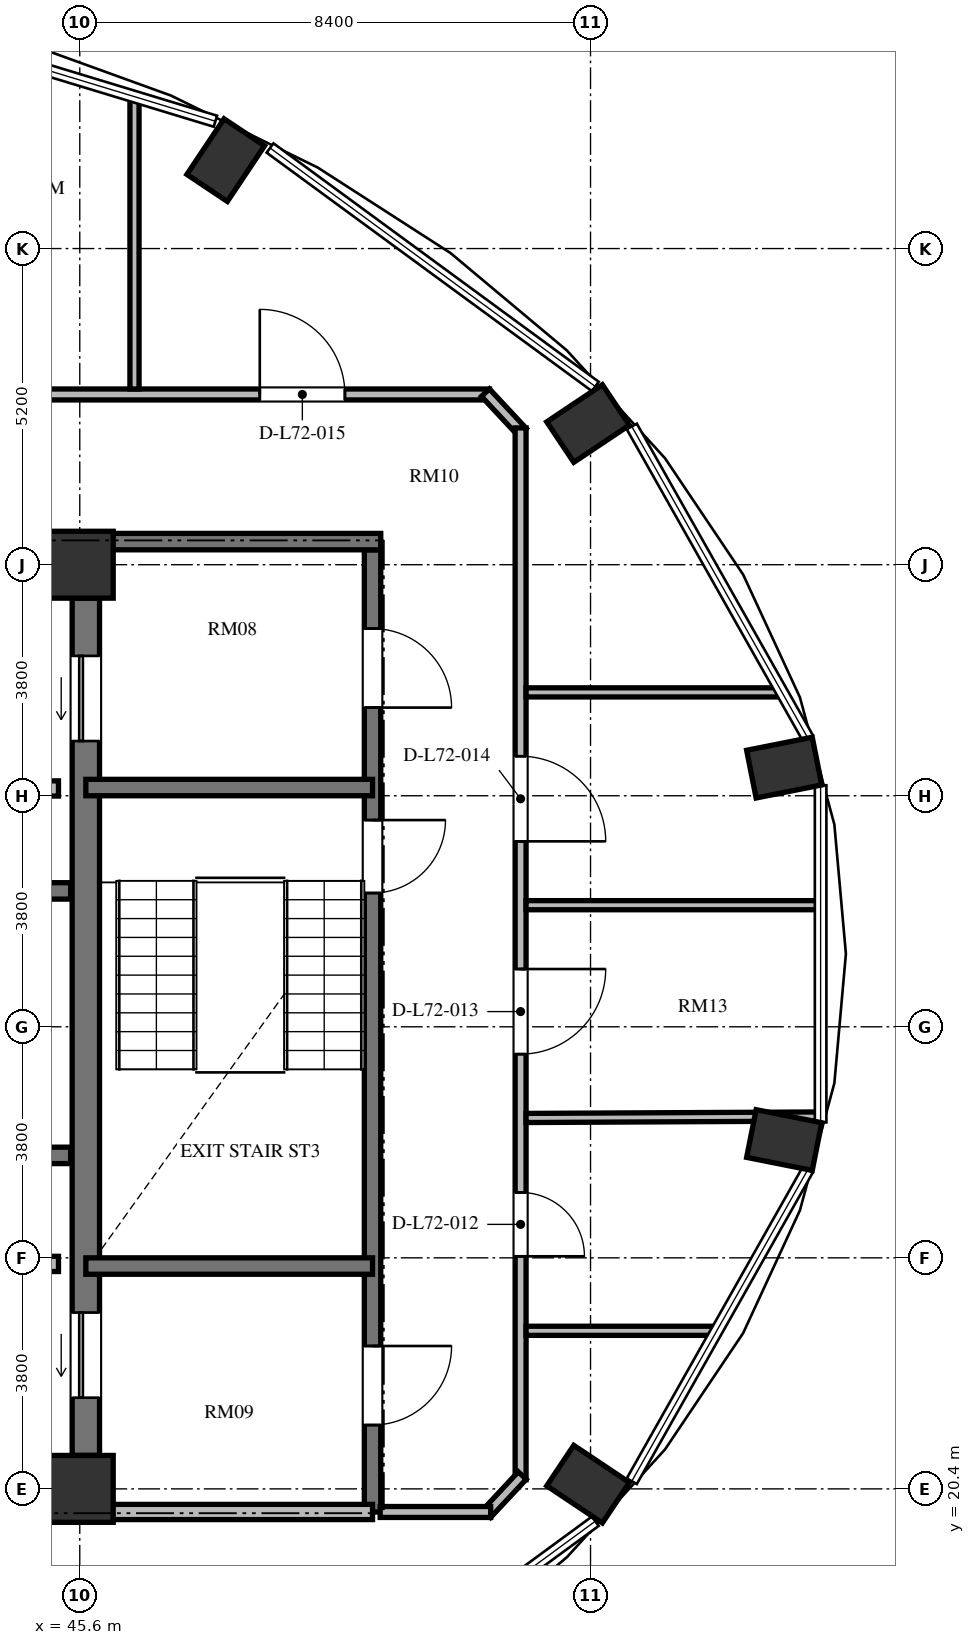
"""IFC4 building model, lengths in metres.
Left out: names, types, materials, properties, quantities, classifications, styles, units other than length and angle.
Written with IfcOpenShell. Run it as: python <this file> out.ifc"""

import sys

from ifc_helpers import new_model, si_unit, direction, frame, frame_2d, origin, origin_2d, place, context, subcontext, project, spatial, rectangle, extrude, element, fill, save


model = new_model("IFC4")
c1 = context("Model", 3, precision=1e-05, world=origin(), true_north=direction((0.0, 1.0)))
c2 = subcontext(c1, "Body", "Model", "MODEL_VIEW")
j1 = project(units=[si_unit("LENGTHUNIT", "METRE"), si_unit("PLANEANGLEUNIT", "RADIAN")], contexts=[c1])
p1 = place(None, origin())
s1 = spatial("IfcSite", under=j1, at=p1, CompositionType="ELEMENT")
p2 = place(p1, origin())
s2 = spatial("IfcBuilding", under=s1, at=p2, CompositionType="ELEMENT")
p3 = place(p2, frame((0.0, 0.0, 276.912)))
s3 = spatial("IfcBuildingStorey", under=s2, at=p3, CompositionType="ELEMENT", Elevation=276.912)
for number, where, z_axis, x_axis in (
    (1, (53.96, 20.478, 0.0), (0.0, 0.0, 1.0), (0.831, -0.556, 0.0)),
    (2, (57.185, 26.137, 0.0), (0.0, 0.0, 1.0), (0.981, -0.195, 0.0)),
    (3, (57.185, 32.263, 0.0), (0.0, 0.0, 1.0), (0.981, 0.195, 0.0)),
    (4, (53.96, 37.923, 0.0), (0.0, 0.0, 1.0), (0.831, 0.556, 0.0)),
    (5, (48.0, 42.254, 0.0), (0.0, 0.0, 1.0), (0.556, 0.831, 0.0)),
):
    element("IfcColumn", number, at=place(p3, frame(where, z_axis=z_axis, x_axis=x_axis)), inside=s3, PredefinedType="COLUMN", context=c2, shape_type="SweptSolid", body=[
        extrude(rectangle(XDim=1.1, YDim=0.8, at=origin_2d()), origin(), (0.0, 0.0, 1.0), 3.648),
    ])
for number, where, z_axis, x_axis in (
    (6, (45.6, 20.4, 0.0), (0.0, 0.0, 1.0), (1.0, 0.0, 0.0)),
    (7, (45.6, 35.6, 0.0), (0.0, 0.0, 1.0), (1.0, 0.0, 0.0)),
):
    element("IfcColumn", number, at=place(p3, frame(where, z_axis=z_axis, x_axis=x_axis)), inside=s3, PredefinedType="COLUMN", context=c2, shape_type="SweptSolid", body=[
        extrude(rectangle(XDim=1.1, YDim=1.1, at=origin_2d()), origin(), (0.0, 0.0, 1.0), 3.648),
    ])
p4 = place(p3, frame((45.7, 20.95, 0.0), z_axis=(0.0, 0.0, 1.0), x_axis=(0.0, 1.0, 0.0)))
e8 = element("IfcWall", 8, at=p4, inside=s3, PredefinedType="SHEAR", context=c2, shape_type="SweptSolid", body=[
    extrude(rectangle(XDim=14.1, YDim=0.45, at=frame_2d((7.05, 0.0))), origin(), (0.0, 0.0, 1.0), 3.648),
])
p5 = place(p4, frame((11.75, 0.0, 0.0)))
e9 = element("IfcOpeningElement", 9, at=p5, cuts=e8, PredefinedType="OPENING", context=c2, shape_type="SweptSolid", body=[
    extrude(rectangle(XDim=1.4, YDim=2.3, at=frame_2d((0.7, 1.15))), frame((0.0, 0.235, 0.0), z_axis=(0.0, -1.0, 0.0), x_axis=(1.0, 0.0, 0.0)), (0.0, 0.0, 1.0), 0.47),
])
p6 = place(p4, frame((0.95, 0.0, 0.0)))
e10 = element("IfcOpeningElement", 10, at=p6, cuts=e8, PredefinedType="OPENING", context=c2, shape_type="SweptSolid", body=[
    extrude(rectangle(XDim=1.4, YDim=2.3, at=frame_2d((0.7, 1.15))), frame((0.0, 0.235, 0.0), z_axis=(0.0, -1.0, 0.0), x_axis=(1.0, 0.0, 0.0)), (0.0, 0.0, 1.0), 0.47),
])
p7 = place(p3, frame((37.465, 30.235, 0.0), z_axis=(0.0, 0.0, 1.0), x_axis=(1.0, 0.0, 0.0)))
e11 = element("IfcWall", 11, at=p7, inside=s3, PredefinedType="SHEAR", context=c2, shape_type="SweptSolid", body=[
    extrude(rectangle(XDim=7.985, YDim=0.27, at=frame_2d((3.992, 0.0))), origin(), (0.0, 0.0, 1.0), 3.648),
])
p8 = place(p7, frame((6.455, 0.0, 0.0)))
e12 = element("IfcOpeningElement", 12, at=p8, cuts=e11, PredefinedType="OPENING", context=c2, shape_type="SweptSolid", body=[
    extrude(rectangle(XDim=1.2, YDim=2.15, at=frame_2d((0.6, 1.075))), frame((0.0, 0.145, 0.0), z_axis=(0.0, -1.0, 0.0), x_axis=(1.0, 0.0, 0.0)), (0.0, 0.0, 1.0), 0.29),
])
p9 = place(p3, frame((37.465, 25.885, 0.0), z_axis=(0.0, 0.0, 1.0), x_axis=(1.0, 0.0, 0.0)))
e13 = element("IfcWall", 13, at=p9, inside=s3, PredefinedType="SHEAR", context=c2, shape_type="SweptSolid", body=[
    extrude(rectangle(XDim=7.985, YDim=0.27, at=frame_2d((3.992, 0.0))), origin(), (0.0, 0.0, 1.0), 3.648),
])
for number, where, z_axis, x_axis in (
    (14, (42.95, 31.92, 0.0), (0.0, 0.0, 1.0), (1.0, 0.0, 0.0)),
    (15, (42.95, 24.1, 0.0), (0.0, 0.0, 1.0), (1.0, 0.0, 0.0)),
):
    element("IfcWall", number, at=place(p3, frame(where, z_axis=z_axis, x_axis=x_axis)), inside=s3, PredefinedType="SOLIDWALL", context=c2, shape_type="SweptSolid", body=[
        extrude(rectangle(XDim=2.3, YDim=0.25, at=frame_2d((1.15, 0.0))), origin(), (0.0, 0.0, 1.0), 3.448),
    ])
p10 = place(p3, frame((50.415, 35.845, 0.0), z_axis=(0.0, 0.0, 1.0), x_axis=(0.0, -1.0, 0.0)))
e16 = element("IfcWall", 16, at=p10, inside=s3, PredefinedType="SHEAR", context=c2, shape_type="SweptSolid", body=[
    extrude(rectangle(XDim=15.825, YDim=0.27, at=frame_2d((7.913, 0.0))), origin(), (0.0, 0.0, 1.0), 3.648),
])
p11 = place(p10, frame((4.445, 0.0, 0.0)))
e17 = element("IfcOpeningElement", 17, at=p11, cuts=e16, PredefinedType="OPENING", context=c2, shape_type="SweptSolid", body=[
    extrude(rectangle(XDim=1.2, YDim=2.15, at=frame_2d((0.6, 1.075))), frame((0.0, 0.145, 0.0), z_axis=(0.0, -1.0, 0.0), x_axis=(1.0, 0.0, 0.0)), (0.0, 0.0, 1.0), 0.29),
])
p12 = place(p10, frame((1.295, 0.0, 0.0)))
e18 = element("IfcOpeningElement", 18, at=p12, cuts=e16, PredefinedType="OPENING", context=c2, shape_type="SweptSolid", body=[
    extrude(rectangle(XDim=1.3, YDim=2.2, at=frame_2d((0.65, 1.1))), frame((0.0, 0.145, 0.0), z_axis=(0.0, -1.0, 0.0), x_axis=(1.0, 0.0, 0.0)), (0.0, 0.0, 1.0), 0.29),
])
p13 = place(p10, frame((13.095, 0.0, 0.0)))
e19 = element("IfcOpeningElement", 19, at=p13, cuts=e16, PredefinedType="OPENING", context=c2, shape_type="SweptSolid", body=[
    extrude(rectangle(XDim=1.3, YDim=2.2, at=frame_2d((0.65, 1.1))), frame((0.0, 0.145, 0.0), z_axis=(0.0, -1.0, 0.0), x_axis=(1.0, 0.0, 0.0)), (0.0, 0.0, 1.0), 0.29),
])
p14 = place(p3, frame((45.925, 35.98, 0.0), z_axis=(0.0, 0.0, 1.0), x_axis=(1.0, 0.0, 0.0)))
e20 = element("IfcWall", 20, at=p14, inside=s3, PredefinedType="SHEAR", context=c2, shape_type="SweptSolid", body=[
    extrude(rectangle(XDim=4.625, YDim=0.27, at=frame_2d((2.312, 0.0))), origin(), (0.0, 0.0, 1.0), 3.648),
])
for number, where, z_axis, x_axis in (
    (21, (45.7, 31.935, 0.0), (0.0, 0.0, 1.0), (1.0, 0.0, 0.0)),
    (22, (45.7, 24.065, 0.0), (0.0, 0.0, 1.0), (1.0, 0.0, 0.0)),
):
    element("IfcWall", number, at=place(p3, frame(where, z_axis=z_axis, x_axis=x_axis)), inside=s3, PredefinedType="SHEAR", context=c2, shape_type="SweptSolid", body=[
        extrude(rectangle(XDim=4.715, YDim=0.27, at=frame_2d((2.357, 0.0))), origin(), (0.0, 0.0, 1.0), 3.648),
    ])
p15 = place(p3, frame((45.7, 20.02, 0.0), z_axis=(0.0, 0.0, 1.0), x_axis=(1.0, 0.0, 0.0)))
e23 = element("IfcWall", 23, at=p15, inside=s3, PredefinedType="SOLIDWALL", context=c2, shape_type="SweptSolid", body=[
    extrude(rectangle(XDim=4.715, YDim=0.25, at=frame_2d((2.357, 0.0))), origin(), (0.0, 0.0, 1.0), 3.448),
])
p16 = place(p3, frame((32.46, 38.4, 0.0), z_axis=(0.0, 0.0, 1.0), x_axis=(1.0, 0.0, 0.0)))
e24 = element("IfcWall", 24, at=p16, inside=s3, PredefinedType="PARTITIONING", context=c2, shape_type="SweptSolid", body=[
    extrude(rectangle(XDim=19.879, YDim=0.18, at=frame_2d((9.939, 0.0))), origin(), (0.0, 0.0, 1.0), 3.073),
])
p17 = place(p16, frame((16.101, 0.0, 0.0)))
e25 = element("IfcOpeningElement", 25, at=p17, cuts=e24, PredefinedType="OPENING", context=c2, shape_type="SweptSolid", body=[
    extrude(rectangle(XDim=1.4, YDim=2.2, at=frame_2d((0.7, 1.1))), frame((0.0, 0.1, 0.0), z_axis=(0.0, -1.0, 0.0), x_axis=(1.0, 0.0, 0.0)), (0.0, 0.0, 1.0), 0.2),
])
p18 = place(p16, frame((10.84, 0.0, 0.0)))
e26 = element("IfcOpeningElement", 26, at=p18, cuts=e24, PredefinedType="OPENING", context=c2, shape_type="SweptSolid", body=[
    extrude(rectangle(XDim=1.4, YDim=2.2, at=frame_2d((0.7, 1.1))), frame((0.0, 0.1, 0.0), z_axis=(0.0, -1.0, 0.0), x_axis=(1.0, 0.0, 0.0)), (0.0, 0.0, 1.0), 0.2),
])
p19 = place(p16, frame((5.84, 0.0, 0.0)))
e27 = element("IfcOpeningElement", 27, at=p19, cuts=e24, PredefinedType="OPENING", context=c2, shape_type="SweptSolid", body=[
    extrude(rectangle(XDim=1.4, YDim=2.2, at=frame_2d((0.7, 1.1))), frame((0.0, 0.1, 0.0), z_axis=(0.0, -1.0, 0.0), x_axis=(1.0, 0.0, 0.0)), (0.0, 0.0, 1.0), 0.2),
])
p20 = place(p16, frame((1.479, 0.0, 0.0)))
e28 = element("IfcOpeningElement", 28, at=p20, cuts=e24, PredefinedType="OPENING", context=c2, shape_type="SweptSolid", body=[
    extrude(rectangle(XDim=1.4, YDim=2.2, at=frame_2d((0.7, 1.1))), frame((0.0, 0.1, 0.0), z_axis=(0.0, -1.0, 0.0), x_axis=(1.0, 0.0, 0.0)), (0.0, 0.0, 1.0), 0.2),
])
p21 = place(p3, frame((52.272, 38.429, 0.0), z_axis=(0.0, 0.0, 1.0), x_axis=(0.682475113459, -0.730908831188, 0.0)))
e29 = element("IfcWall", 29, at=p21, inside=s3, PredefinedType="PARTITIONING", context=c2, shape_type="SweptSolid", body=[
    extrude(rectangle(XDim=0.887, YDim=0.18, at=frame_2d((0.444, 0.0))), origin(), (0.0, 0.0, 1.0), 3.448),
])
p22 = place(p3, frame((52.85, 37.85, 0.0), z_axis=(0.0, 0.0, 1.0), x_axis=(0.0, -1.0, 0.0)))
e30 = element("IfcWall", 30, at=p22, inside=s3, PredefinedType="PARTITIONING", context=c2, shape_type="SweptSolid", body=[
    extrude(rectangle(XDim=17.3, YDim=0.18, at=frame_2d((8.65, 0.0))), origin(), (0.0, 0.0, 1.0), 3.448),
])
p23 = place(p22, frame((12.575, 0.0, 0.0)))
e31 = element("IfcOpeningElement", 31, at=p23, cuts=e30, PredefinedType="OPENING", context=c2, shape_type="SweptSolid", body=[
    extrude(rectangle(XDim=1.05, YDim=2.15, at=frame_2d((0.525, 1.075))), frame((0.0, 0.1, 0.0), z_axis=(0.0, -1.0, 0.0), x_axis=(1.0, 0.0, 0.0)), (0.0, 0.0, 1.0), 0.2),
])
p24 = place(p22, frame((8.9, 0.0, 0.0)))
e32 = element("IfcOpeningElement", 32, at=p24, cuts=e30, PredefinedType="OPENING", context=c2, shape_type="SweptSolid", body=[
    extrude(rectangle(XDim=1.4, YDim=2.2, at=frame_2d((0.7, 1.1))), frame((0.0, 0.1, 0.0), z_axis=(0.0, -1.0, 0.0), x_axis=(1.0, 0.0, 0.0)), (0.0, 0.0, 1.0), 0.2),
])
p25 = place(p22, frame((5.4, 0.0, 0.0)))
e33 = element("IfcOpeningElement", 33, at=p25, cuts=e30, PredefinedType="OPENING", context=c2, shape_type="SweptSolid", body=[
    extrude(rectangle(XDim=1.4, YDim=2.2, at=frame_2d((0.7, 1.1))), frame((0.0, 0.1, 0.0), z_axis=(0.0, -1.0, 0.0), x_axis=(1.0, 0.0, 0.0)), (0.0, 0.0, 1.0), 0.2),
])
p26 = place(p3, frame((52.877, 20.619, 0.0), z_axis=(0.0, 0.0, 1.0), x_axis=(-0.682409308253, -0.730970270264, 0.0)))
e34 = element("IfcWall", 34, at=p26, inside=s3, PredefinedType="PARTITIONING", context=c2, shape_type="SweptSolid", body=[
    extrude(rectangle(XDim=0.86, YDim=0.18, at=frame_2d((0.43, 0.0))), origin(), (0.0, 0.0, 1.0), 3.448),
])
p27 = place(p3, frame((52.358, 20.02, 0.0), z_axis=(0.0, 0.0, 1.0), x_axis=(-1.0, 0.0, 0.0)))
e35 = element("IfcWall", 35, at=p27, inside=s3, PredefinedType="PARTITIONING", context=c2, shape_type="SweptSolid", body=[
    extrude(rectangle(XDim=1.818, YDim=0.18, at=frame_2d((0.909, 0.0))), origin(), (0.0, 0.0, 1.0), 3.448),
])
p28 = place(p3, frame((52.94, 23.0, 0.0), z_axis=(0.0, 0.0, 1.0), x_axis=(1.0, 0.0, 0.0)))
e36 = element("IfcWall", 36, at=p28, inside=s3, PredefinedType="PARTITIONING", context=c2, shape_type="SweptSolid", body=[
    extrude(rectangle(XDim=3.126, YDim=0.15, at=frame_2d((1.563, 0.0))), origin(), (0.0, 0.0, 1.0), 3.448),
])
p29 = place(p3, frame((52.94, 26.5, 0.0), z_axis=(0.0, 0.0, 1.0), x_axis=(0.999987566883, 0.004986589892, 0.0)))
e37 = element("IfcWall", 37, at=p29, inside=s3, PredefinedType="PARTITIONING", context=c2, shape_type="SweptSolid", body=[
    extrude(rectangle(XDim=4.847, YDim=0.15, at=frame_2d((2.423, 0.0))), origin(), (0.0, 0.0, 1.0), 3.448),
])
p30 = place(p3, frame((52.94, 30.0, 0.0), z_axis=(0.0, 0.0, 1.0), x_axis=(1.0, 0.0, 0.0)))
e38 = element("IfcWall", 38, at=p30, inside=s3, PredefinedType="PARTITIONING", context=c2, shape_type="SweptSolid", body=[
    extrude(rectangle(XDim=4.832, YDim=0.15, at=frame_2d((2.416, 0.0))), origin(), (0.0, 0.0, 1.0), 3.448),
])
p31 = place(p3, frame((52.94, 33.5, 0.0), z_axis=(0.0, 0.0, 1.0), x_axis=(1.0, 0.0, 0.0)))
e39 = element("IfcWall", 39, at=p31, inside=s3, PredefinedType="PARTITIONING", context=c2, shape_type="SweptSolid", body=[
    extrude(rectangle(XDim=4.199, YDim=0.15, at=frame_2d((2.1, 0.0))), origin(), (0.0, 0.0, 1.0), 3.448),
])
p32 = place(p3, frame((46.5, 38.49, 0.0), z_axis=(0.0, 0.0, 1.0), x_axis=(0.0, 1.0, 0.0)))
e40 = element("IfcWall", 40, at=p32, inside=s3, PredefinedType="PARTITIONING", context=c2, shape_type="SweptSolid", body=[
    extrude(rectangle(XDim=4.791, YDim=0.15, at=frame_2d((2.396, 0.0))), origin(), (0.0, 0.0, 1.0), 3.448),
])
p33 = place(p5, origin())
e41 = element("IfcDoor", 41, at=p33, inside=s3, OperationType="SLIDING_TO_LEFT", PredefinedType="DOOR", context=c2, shape_type="SweptSolid", body=[
    extrude(rectangle(XDim=1.4, YDim=2.3, at=frame_2d((0.7, 1.15))), frame((0.0, 0.025, 0.0), z_axis=(0.0, -1.0, 0.0), x_axis=(1.0, 0.0, 0.0)), (0.0, 0.0, 1.0), 0.05),
])
fill(e9, e41)
p34 = place(p6, origin())
e42 = element("IfcDoor", 42, at=p34, inside=s3, OperationType="SLIDING_TO_LEFT", PredefinedType="DOOR", context=c2, shape_type="SweptSolid", body=[
    extrude(rectangle(XDim=1.4, YDim=2.3, at=frame_2d((0.7, 1.15))), frame((0.0, 0.025, 0.0), z_axis=(0.0, -1.0, 0.0), x_axis=(1.0, 0.0, 0.0)), (0.0, 0.0, 1.0), 0.05),
])
fill(e10, e42)
p35 = place(p11, origin())
e43 = element("IfcDoor", 43, at=p35, inside=s3, OperationType="SINGLE_SWING_LEFT", PredefinedType="DOOR", context=c2, shape_type="SweptSolid", body=[
    extrude(rectangle(XDim=1.2, YDim=2.15, at=frame_2d((0.6, 1.075))), frame((0.0, 0.025, 0.0), z_axis=(0.0, -1.0, 0.0), x_axis=(1.0, 0.0, 0.0)), (0.0, 0.0, 1.0), 0.05),
])
fill(e17, e43)
p36 = place(p12, origin())
e44 = element("IfcDoor", 44, at=p36, inside=s3, OperationType="SINGLE_SWING_RIGHT", PredefinedType="DOOR", context=c2, shape_type="SweptSolid", body=[
    extrude(rectangle(XDim=1.3, YDim=2.2, at=frame_2d((0.65, 1.1))), frame((0.0, 0.025, 0.0), z_axis=(0.0, -1.0, 0.0), x_axis=(1.0, 0.0, 0.0)), (0.0, 0.0, 1.0), 0.05),
])
fill(e18, e44)
p37 = place(p13, origin())
e45 = element("IfcDoor", 45, at=p37, inside=s3, OperationType="SINGLE_SWING_LEFT", PredefinedType="DOOR", context=c2, shape_type="SweptSolid", body=[
    extrude(rectangle(XDim=1.3, YDim=2.2, at=frame_2d((0.65, 1.1))), frame((0.0, 0.025, 0.0), z_axis=(0.0, -1.0, 0.0), x_axis=(1.0, 0.0, 0.0)), (0.0, 0.0, 1.0), 0.05),
])
fill(e19, e45)
p38 = place(p23, origin())
e46 = element("IfcDoor", 46, at=p38, inside=s3, OperationType="SINGLE_SWING_RIGHT", PredefinedType="DOOR", context=c2, shape_type="SweptSolid", body=[
    extrude(rectangle(XDim=1.05, YDim=2.15, at=frame_2d((0.525, 1.075))), frame((0.0, 0.025, 0.0), z_axis=(0.0, -1.0, 0.0), x_axis=(1.0, 0.0, 0.0)), (0.0, 0.0, 1.0), 0.05),
])
fill(e31, e46)
p39 = place(p24, origin())
e47 = element("IfcDoor", 47, at=p39, inside=s3, OperationType="SINGLE_SWING_LEFT", PredefinedType="DOOR", context=c2, shape_type="SweptSolid", body=[
    extrude(rectangle(XDim=1.4, YDim=2.2, at=frame_2d((0.7, 1.1))), frame((0.0, 0.025, 0.0), z_axis=(0.0, -1.0, 0.0), x_axis=(1.0, 0.0, 0.0)), (0.0, 0.0, 1.0), 0.05),
])
fill(e32, e47)
p40 = place(p25, origin())
e48 = element("IfcDoor", 48, at=p40, inside=s3, OperationType="SINGLE_SWING_RIGHT", PredefinedType="DOOR", context=c2, shape_type="SweptSolid", body=[
    extrude(rectangle(XDim=1.4, YDim=2.2, at=frame_2d((0.7, 1.1))), frame((0.0, 0.025, 0.0), z_axis=(0.0, -1.0, 0.0), x_axis=(1.0, 0.0, 0.0)), (0.0, 0.0, 1.0), 0.05),
])
fill(e33, e48)
p41 = place(p17, origin())
e49 = element("IfcDoor", 49, at=p41, inside=s3, OperationType="SINGLE_SWING_LEFT", PredefinedType="DOOR", context=c2, shape_type="SweptSolid", body=[
    extrude(rectangle(XDim=1.4, YDim=2.2, at=frame_2d((0.7, 1.1))), frame((0.0, 0.025, 0.0), z_axis=(0.0, -1.0, 0.0), x_axis=(1.0, 0.0, 0.0)), (0.0, 0.0, 1.0), 0.05),
])
fill(e25, e49)
save(model, sys.argv[1])
